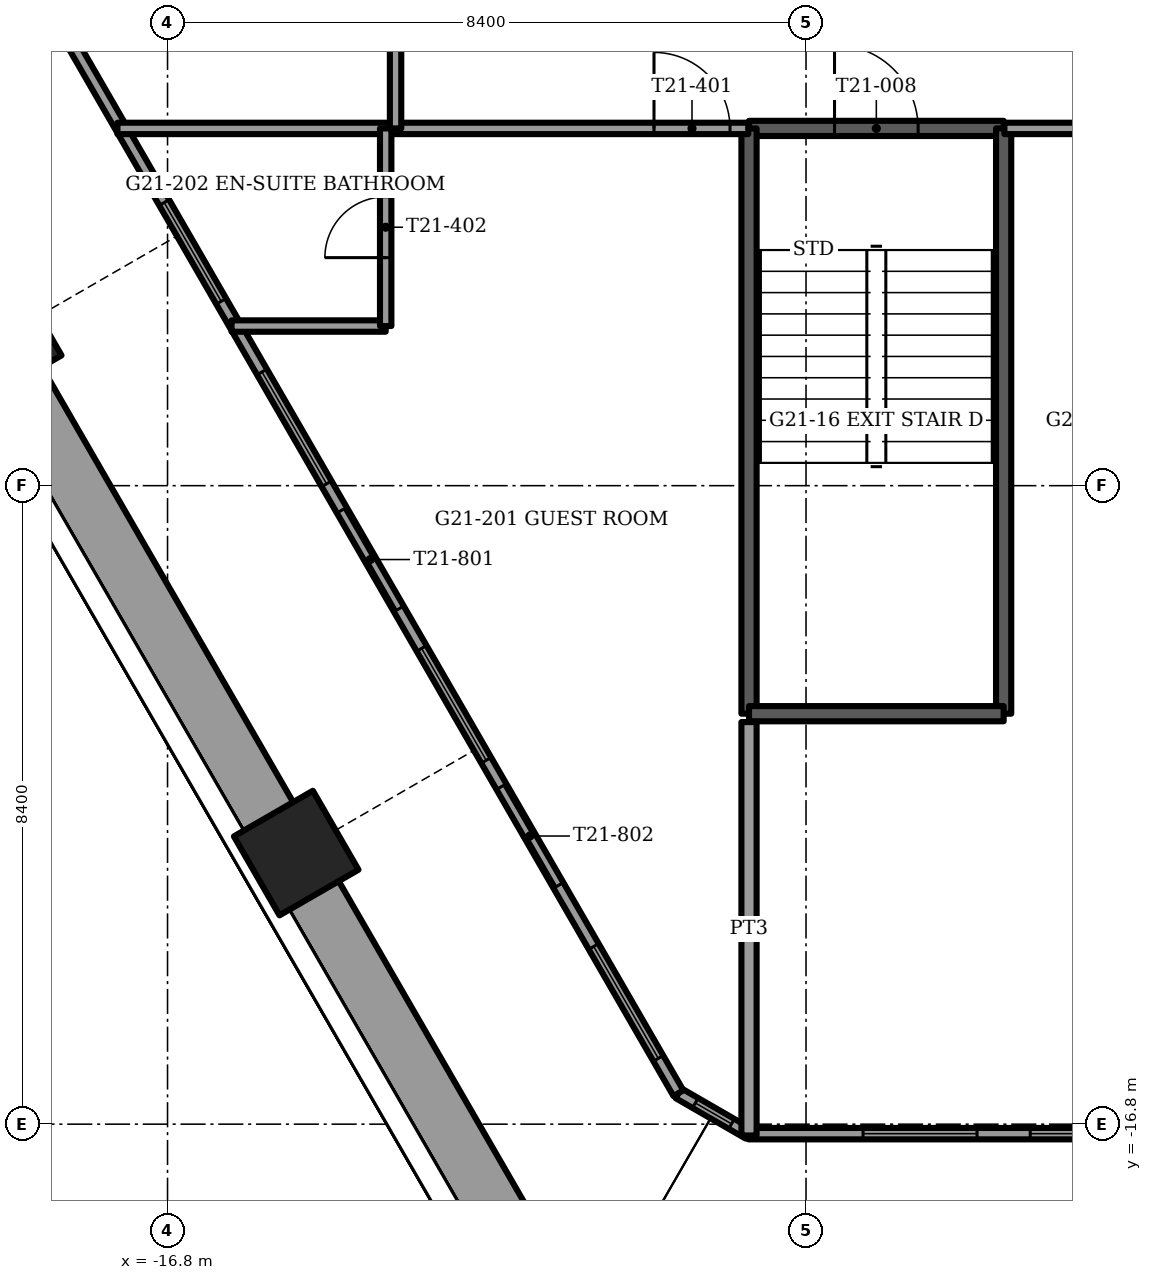
"""IFC4 building model, lengths in metres.
Left out: names, types, materials, properties, quantities, classifications, styles, units other than length and angle.
Written with IfcOpenShell. Run it as: python <this file> out.ifc"""

import sys

from ifc_helpers import new_model, si_unit, direction, frame, frame_2d, origin, origin_2d, place, context, subcontext, project, spatial, rectangle, extrude, element, fill, save


model = new_model("IFC4")
c1 = context("Model", 3, precision=1e-05, world=origin(), true_north=direction((0.0, 1.0)))
c2 = subcontext(c1, "Body", "Model", "MODEL_VIEW")
j1 = project(units=[si_unit("LENGTHUNIT", "METRE"), si_unit("PLANEANGLEUNIT", "RADIAN")], contexts=[c1])
p1 = place(None, origin())
s1 = spatial("IfcSite", under=j1, at=p1, CompositionType="ELEMENT")
p2 = place(p1, origin())
s2 = spatial("IfcBuilding", under=s1, at=p2, CompositionType="ELEMENT")
p3 = place(p2, frame((0.0, 0.0, 85.5)))
s3 = spatial("IfcBuildingStorey", under=s2, at=p3, CompositionType="ELEMENT", Elevation=85.5)
for number, where, z_axis, x_axis in (
    (1, (-19.014, -6.467, -1.2), (0.0, 0.0, 1.0), (-0.5, 0.866, 0.0)),
    (2, (-15.107, -13.233, -1.2), (0.0, 0.0, 1.0), (-0.5, 0.866, 0.0)),
):
    element("IfcColumn", number, at=place(p3, frame(where, z_axis=z_axis, x_axis=x_axis)), inside=s3, PredefinedType="COLUMN", context=c2, shape_type="SweptSolid", body=[
        extrude(rectangle(XDim=1.2, YDim=1.2, at=origin_2d()), origin(), (0.0, 0.0, 1.0), 3.75),
    ])
p4 = place(p3, frame((-18.859, -7.035, 0.0), z_axis=(0.0, 0.0, 1.0), x_axis=(0.499999023957, -0.866025967302, 0.0)))
e3 = element("IfcWall", 3, at=p4, inside=s3, PredefinedType="PARAPET", context=c2, shape_type="SweptSolid", body=[
    extrude(rectangle(XDim=6.673, YDim=0.9, at=frame_2d((3.337, 0.0))), origin(), (0.0, 0.0, 1.0), 1.1),
])
p5 = place(p3, frame((-14.952, -13.802, 0.0), z_axis=(0.0, 0.0, 1.0), x_axis=(0.499982754166, -0.866035360443, 0.0)))
e4 = element("IfcWall", 4, at=p5, inside=s3, PredefinedType="PARAPET", context=c2, shape_type="SweptSolid", body=[
    extrude(rectangle(XDim=6.333, YDim=0.9, at=frame_2d((3.167, 0.0))), origin(), (0.0, 0.0, 1.0), 1.1),
])
p6 = place(p3, frame((-19.236, -0.532, 0.0), z_axis=(0.0, 0.0, 1.0), x_axis=(0.499995945303, -0.866027744752, 0.0)))
e5 = element("IfcWall", 5, at=p6, inside=s3, PredefinedType="SOLIDWALL", context=c2, shape_type="SweptSolid", body=[
    extrude(rectangle(XDim=18.314, YDim=0.15, at=frame_2d((9.157, 0.0))), origin(), (0.0, 0.0, 1.0), 3.45),
])
p7 = place(p6, frame((4.784, 0.0, 0.15)))
e6 = element("IfcOpeningElement", 6, at=p7, cuts=e5, PredefinedType="OPENING", context=c2, shape_type="SweptSolid", body=[
    extrude(rectangle(XDim=1.5, YDim=2.85, at=frame_2d((0.75, 1.425))), frame((0.0, 0.075, 0.0), z_axis=(0.0, -1.0, 0.0), x_axis=(1.0, 0.0, 0.0)), (0.0, 0.0, 1.0), 0.15),
])
p8 = place(p6, frame((7.357, 0.0, 0.15)))
e7 = element("IfcOpeningElement", 7, at=p8, cuts=e5, PredefinedType="OPENING", context=c2, shape_type="SweptSolid", body=[
    extrude(rectangle(XDim=1.7, YDim=2.85, at=frame_2d((0.85, 1.425))), frame((0.0, 0.075, 0.0), z_axis=(0.0, -1.0, 0.0), x_axis=(1.0, 0.0, 0.0)), (0.0, 0.0, 1.0), 0.15),
])
p9 = place(p6, frame((9.457, 0.0, 0.0)))
e8 = element("IfcOpeningElement", 8, at=p9, cuts=e5, PredefinedType="OPENING", context=c2, shape_type="SweptSolid", body=[
    extrude(rectangle(XDim=1.5, YDim=2.4, at=frame_2d((0.75, 1.2))), frame((0.0, 0.075, 0.0), z_axis=(0.0, -1.0, 0.0), x_axis=(1.0, 0.0, 0.0)), (0.0, 0.0, 1.0), 0.15),
])
p10 = place(p6, frame((11.557, 0.0, 0.15)))
e9 = element("IfcOpeningElement", 9, at=p10, cuts=e5, PredefinedType="OPENING", context=c2, shape_type="SweptSolid", body=[
    extrude(rectangle(XDim=1.7, YDim=2.85, at=frame_2d((0.85, 1.425))), frame((0.0, 0.075, 0.0), z_axis=(0.0, -1.0, 0.0), x_axis=(1.0, 0.0, 0.0)), (0.0, 0.0, 1.0), 0.15),
])
p11 = place(p6, frame((13.657, 0.0, 0.0)))
e10 = element("IfcOpeningElement", 10, at=p11, cuts=e5, PredefinedType="OPENING", context=c2, shape_type="SweptSolid", body=[
    extrude(rectangle(XDim=1.5, YDim=2.4, at=frame_2d((0.75, 1.2))), frame((0.0, 0.075, 0.0), z_axis=(0.0, -1.0, 0.0), x_axis=(1.0, 0.0, 0.0)), (0.0, 0.0, 1.0), 0.15),
])
p12 = place(p6, frame((0.528, 0.0, 0.15)))
e11 = element("IfcOpeningElement", 11, at=p12, cuts=e5, PredefinedType="OPENING", context=c2, shape_type="SweptSolid", body=[
    extrude(rectangle(XDim=1.7, YDim=2.73, at=frame_2d((0.85, 1.365))), frame((0.0, 0.075, 0.0), z_axis=(0.0, -1.0, 0.0), x_axis=(1.0, 0.0, 0.0)), (0.0, 0.0, 1.0), 0.15),
])
p13 = place(p6, frame((16.085, 0.0, 0.15)))
e12 = element("IfcOpeningElement", 12, at=p13, cuts=e5, PredefinedType="OPENING", context=c2, shape_type="SweptSolid", body=[
    extrude(rectangle(XDim=1.7, YDim=2.73, at=frame_2d((0.85, 1.365))), frame((0.0, 0.075, 0.0), z_axis=(0.0, -1.0, 0.0), x_axis=(1.0, 0.0, 0.0)), (0.0, 0.0, 1.0), 0.15),
])
p14 = place(p3, frame((-9.157, -16.925, 0.0), z_axis=(0.0, 0.0, 1.0), x_axis=(1.0, 0.0, 0.0)))
e13 = element("IfcWall", 13, at=p14, inside=s3, PredefinedType="SOLIDWALL", context=c2, shape_type="SweptSolid", body=[
    extrude(rectangle(XDim=18.313, YDim=0.15, at=frame_2d((9.157, 0.0))), origin(), (0.0, 0.0, 1.0), 3.45),
])
p15 = place(p14, frame((3.707, 0.0, 0.15)))
e14 = element("IfcOpeningElement", 14, at=p15, cuts=e13, PredefinedType="OPENING", context=c2, shape_type="SweptSolid", body=[
    extrude(rectangle(XDim=0.9, YDim=2.85, at=frame_2d((0.45, 1.425))), frame((0.0, 0.075, 0.0), z_axis=(0.0, -1.0, 0.0), x_axis=(1.0, 0.0, 0.0)), (0.0, 0.0, 1.0), 0.15),
])
p16 = place(p14, frame((1.507, 0.0, 0.15)))
e15 = element("IfcOpeningElement", 15, at=p16, cuts=e13, PredefinedType="OPENING", context=c2, shape_type="SweptSolid", body=[
    extrude(rectangle(XDim=1.5, YDim=2.85, at=frame_2d((0.75, 1.425))), frame((0.0, 0.075, 0.0), z_axis=(0.0, -1.0, 0.0), x_axis=(1.0, 0.0, 0.0)), (0.0, 0.0, 1.0), 0.15),
])
p17 = place(p14, frame((5.257, 0.0, 0.15)))
e16 = element("IfcOpeningElement", 16, at=p17, cuts=e13, PredefinedType="OPENING", context=c2, shape_type="SweptSolid", body=[
    extrude(rectangle(XDim=1.7, YDim=2.85, at=frame_2d((0.85, 1.425))), frame((0.0, 0.075, 0.0), z_axis=(0.0, -1.0, 0.0), x_axis=(1.0, 0.0, 0.0)), (0.0, 0.0, 1.0), 0.15),
])
p18 = place(p14, frame((7.307, 0.0, 0.15)))
e17 = element("IfcOpeningElement", 17, at=p18, cuts=e13, PredefinedType="OPENING", context=c2, shape_type="SweptSolid", body=[
    extrude(rectangle(XDim=1.5, YDim=2.85, at=frame_2d((0.75, 1.425))), frame((0.0, 0.075, 0.0), z_axis=(0.0, -1.0, 0.0), x_axis=(1.0, 0.0, 0.0)), (0.0, 0.0, 1.0), 0.15),
])
p19 = place(p14, frame((9.507, 0.0, 0.15)))
e18 = element("IfcOpeningElement", 18, at=p19, cuts=e13, PredefinedType="OPENING", context=c2, shape_type="SweptSolid", body=[
    extrude(rectangle(XDim=1.7, YDim=2.85, at=frame_2d((0.85, 1.425))), frame((0.0, 0.075, 0.0), z_axis=(0.0, -1.0, 0.0), x_axis=(1.0, 0.0, 0.0)), (0.0, 0.0, 1.0), 0.15),
])
p20 = place(p14, frame((11.557, 0.0, 0.0)))
e19 = element("IfcOpeningElement", 19, at=p20, cuts=e13, PredefinedType="OPENING", context=c2, shape_type="SweptSolid", body=[
    extrude(rectangle(XDim=1.5, YDim=2.4, at=frame_2d((0.75, 1.2))), frame((0.0, 0.075, 0.0), z_axis=(0.0, -1.0, 0.0), x_axis=(1.0, 0.0, 0.0)), (0.0, 0.0, 1.0), 0.15),
])
p21 = place(p14, frame((15.307, 0.0, 0.15)))
e20 = element("IfcOpeningElement", 20, at=p21, cuts=e13, PredefinedType="OPENING", context=c2, shape_type="SweptSolid", body=[
    extrude(rectangle(XDim=1.7, YDim=2.85, at=frame_2d((0.85, 1.425))), frame((0.0, 0.075, 0.0), z_axis=(0.0, -1.0, 0.0), x_axis=(1.0, 0.0, 0.0)), (0.0, 0.0, 1.0), 0.15),
])
p22 = place(p3, frame((-10.079, -16.393, 0.0), z_axis=(0.0, 0.0, 1.0), x_axis=(0.866048165231, -0.499960573946, 0.0)))
e21 = element("IfcWall", 21, at=p22, inside=s3, PredefinedType="SOLIDWALL", context=c2, shape_type="SweptSolid", body=[
    extrude(rectangle(XDim=1.065, YDim=0.15, at=frame_2d((0.532, 0.0))), origin(), (0.0, 0.0, 1.0), 3.45),
])
p23 = place(p22, frame((0.258, 0.0, 0.15)))
e22 = element("IfcOpeningElement", 22, at=p23, cuts=e21, PredefinedType="OPENING", context=c2, shape_type="SweptSolid", body=[
    extrude(rectangle(XDim=0.55, YDim=2.85, at=frame_2d((0.275, 1.425))), frame((0.0, 0.075, 0.0), z_axis=(0.0, -1.0, 0.0), x_axis=(1.0, 0.0, 0.0)), (0.0, 0.0, 1.0), 0.15),
])
p24 = place(p3, frame((-9.15, -3.7, -0.3), z_axis=(0.0, 0.0, 1.0), x_axis=(1.0, 0.0, 0.0)))
e23 = element("IfcWall", 23, at=p24, inside=s3, PredefinedType="SOLIDWALL", context=c2, shape_type="SweptSolid", body=[
    extrude(rectangle(XDim=3.35, YDim=0.2, at=frame_2d((1.675, 0.0))), origin(), (0.0, 0.0, 1.0), 3.75),
])
p25 = place(p24, frame((1.125, 0.0, 0.0)))
e24 = element("IfcOpeningElement", 24, at=p25, cuts=e23, PredefinedType="OPENING", context=c2, shape_type="SweptSolid", body=[
    extrude(rectangle(XDim=1.1, YDim=2.1, at=frame_2d((0.55, 1.05))), frame((0.0, 0.1, 0.0), z_axis=(0.0, -1.0, 0.0), x_axis=(1.0, 0.0, 0.0)), (0.0, 0.0, 1.0), 0.2),
])
for number, where, z_axis, x_axis in (
    (25, (-9.15, -3.7, -0.3), (0.0, 0.0, 1.0), (0.0, -1.0, 0.0)),
    (26, (-5.8, -3.7, -0.3), (0.0, 0.0, 1.0), (0.0, -1.0, 0.0)),
):
    element("IfcWall", number, at=place(p3, frame(where, z_axis=z_axis, x_axis=x_axis)), inside=s3, PredefinedType="SOLIDWALL", context=c2, shape_type="SweptSolid", body=[
        extrude(rectangle(XDim=7.7, YDim=0.2, at=frame_2d((3.85, 0.0))), origin(), (0.0, 0.0, 1.0), 3.75),
    ])
p26 = place(p3, frame((-9.15, -11.4, -0.3), z_axis=(0.0, 0.0, 1.0), x_axis=(1.0, 0.0, 0.0)))
e27 = element("IfcWall", 27, at=p26, inside=s3, PredefinedType="SOLIDWALL", context=c2, shape_type="SweptSolid", body=[
    extrude(rectangle(XDim=3.35, YDim=0.2, at=frame_2d((1.675, 0.0))), origin(), (0.0, 0.0, 1.0), 3.75),
])
p27 = place(p3, frame((-15.958, -6.3, 0.0), z_axis=(0.0, 0.0, 1.0), x_axis=(1.0, 0.0, 0.0)))
e28 = element("IfcWall", 28, at=p27, inside=s3, PredefinedType="PARTITIONING", context=c2, shape_type="SweptSolid", body=[
    extrude(rectangle(XDim=2.028, YDim=0.15, at=frame_2d((1.014, 0.0))), origin(), (0.0, 0.0, 1.0), 3.45),
])
p28 = place(p3, frame((-17.459, -3.7, 0.0), z_axis=(0.0, 0.0, 1.0), x_axis=(1.0, 0.0, 0.0)))
e29 = element("IfcWall", 29, at=p28, inside=s3, PredefinedType="PARTITIONING", context=c2, shape_type="SweptSolid", body=[
    extrude(rectangle(XDim=8.299, YDim=0.15, at=frame_2d((4.149, 0.0))), origin(), (0.0, 0.0, 1.0), 3.45),
])
p29 = place(p28, frame((7.059, 0.0, 0.0)))
e30 = element("IfcOpeningElement", 30, at=p29, cuts=e29, PredefinedType="OPENING", context=c2, shape_type="SweptSolid", body=[
    extrude(rectangle(XDim=1.0, YDim=2.1, at=frame_2d((0.5, 1.05))), frame((0.0, 0.075, 0.0), z_axis=(0.0, -1.0, 0.0), x_axis=(1.0, 0.0, 0.0)), (0.0, 0.0, 1.0), 0.15),
])
p30 = place(p3, frame((-5.79, -3.7, 0.0), z_axis=(0.0, 0.0, 1.0), x_axis=(1.0, 0.0, 0.0)))
e31 = element("IfcWall", 31, at=p30, inside=s3, PredefinedType="PARTITIONING", context=c2, shape_type="SweptSolid", body=[
    extrude(rectangle(XDim=11.58, YDim=0.15, at=frame_2d((5.79, 0.0))), origin(), (0.0, 0.0, 1.0), 3.45),
])
p31 = place(p30, frame((2.39, 0.0, 0.0)))
e32 = element("IfcOpeningElement", 32, at=p31, cuts=e31, PredefinedType="OPENING", context=c2, shape_type="SweptSolid", body=[
    extrude(rectangle(XDim=1.0, YDim=2.1, at=frame_2d((0.5, 1.05))), frame((0.0, 0.075, 0.0), z_axis=(0.0, -1.0, 0.0), x_axis=(1.0, 0.0, 0.0)), (0.0, 0.0, 1.0), 0.15),
])
p32 = place(p30, frame((10.34, 0.0, 0.0)))
e33 = element("IfcOpeningElement", 33, at=p32, cuts=e31, PredefinedType="OPENING", context=c2, shape_type="SweptSolid", body=[
    extrude(rectangle(XDim=1.0, YDim=2.1, at=frame_2d((0.5, 1.05))), frame((0.0, 0.075, 0.0), z_axis=(0.0, -1.0, 0.0), x_axis=(1.0, 0.0, 0.0)), (0.0, 0.0, 1.0), 0.15),
])
p33 = place(p3, frame((-9.15, -16.949, 0.0), z_axis=(0.0, 0.0, 1.0), x_axis=(0.0, 1.0, 0.0)))
e34 = element("IfcWall", 34, at=p33, inside=s3, PredefinedType="PARTITIONING", context=c2, shape_type="SweptSolid", body=[
    extrude(rectangle(XDim=5.439, YDim=0.2, at=frame_2d((2.719, 0.0))), origin(), (0.0, 0.0, 1.0), 3.45),
])
p34 = place(p3, frame((-13.8, -3.7, 0.0), z_axis=(0.0, 0.0, 1.0), x_axis=(0.0, 1.0, 0.0)))
e35 = element("IfcWall", 35, at=p34, inside=s3, PredefinedType="PARTITIONING", context=c2, shape_type="SweptSolid", body=[
    extrude(rectangle(XDim=13.738, YDim=0.15, at=frame_2d((6.869, 0.0))), origin(), (0.0, 0.0, 1.0), 3.45),
])
p35 = place(p34, frame((4.412, 0.0, 0.0)))
e36 = element("IfcOpeningElement", 36, at=p35, cuts=e35, PredefinedType="OPENING", context=c2, shape_type="SweptSolid", body=[
    extrude(rectangle(XDim=1.0, YDim=2.1, at=frame_2d((0.5, 1.05))), frame((0.0, 0.075, 0.0), z_axis=(0.0, -1.0, 0.0), x_axis=(1.0, 0.0, 0.0)), (0.0, 0.0, 1.0), 0.15),
])
p36 = place(p34, frame((10.45, 0.0, 0.0)))
e37 = element("IfcOpeningElement", 37, at=p36, cuts=e35, PredefinedType="OPENING", context=c2, shape_type="SweptSolid", body=[
    extrude(rectangle(XDim=1.0, YDim=2.1, at=frame_2d((0.5, 1.05))), frame((0.0, 0.075, 0.0), z_axis=(0.0, -1.0, 0.0), x_axis=(1.0, 0.0, 0.0)), (0.0, 0.0, 1.0), 0.15),
])
p37 = place(p3, frame((-13.93, -6.3, 0.0), z_axis=(0.0, 0.0, 1.0), x_axis=(0.0, 1.0, 0.0)))
e38 = element("IfcWall", 38, at=p37, inside=s3, PredefinedType="PARTITIONING", context=c2, shape_type="SweptSolid", body=[
    extrude(rectangle(XDim=2.6, YDim=0.15, at=frame_2d((1.3, 0.0))), origin(), (0.0, 0.0, 1.0), 3.45),
])
p38 = place(p37, frame((0.9, 0.0, 0.0)))
e39 = element("IfcOpeningElement", 39, at=p38, cuts=e38, PredefinedType="OPENING", context=c2, shape_type="SweptSolid", body=[
    extrude(rectangle(XDim=0.8, YDim=2.1, at=frame_2d((0.4, 1.05))), frame((0.0, 0.075, 0.0), z_axis=(0.0, -1.0, 0.0), x_axis=(1.0, 0.0, 0.0)), (0.0, 0.0, 1.0), 0.15),
])
p39 = place(p7, origin())
e40 = element("IfcWindow", 40, at=p39, inside=s3, PartitioningType="SINGLE_PANEL", PredefinedType="WINDOW", context=c2, shape_type="SweptSolid", body=[
    extrude(rectangle(XDim=1.5, YDim=2.85, at=frame_2d((0.75, 1.425))), frame((0.0, 0.03, 0.0), z_axis=(0.0, -1.0, 0.0), x_axis=(1.0, 0.0, 0.0)), (0.0, 0.0, 1.0), 0.06),
])
fill(e6, e40)
p40 = place(p8, origin())
e41 = element("IfcWindow", 41, at=p40, inside=s3, PartitioningType="SINGLE_PANEL", PredefinedType="WINDOW", context=c2, shape_type="SweptSolid", body=[
    extrude(rectangle(XDim=1.7, YDim=2.85, at=frame_2d((0.85, 1.425))), frame((0.0, 0.03, 0.0), z_axis=(0.0, -1.0, 0.0), x_axis=(1.0, 0.0, 0.0)), (0.0, 0.0, 1.0), 0.06),
])
fill(e7, e41)
p41 = place(p9, origin())
e42 = element("IfcDoor", 42, at=p41, inside=s3, OperationType="SLIDING_TO_RIGHT", PredefinedType="DOOR", context=c2, shape_type="SweptSolid", body=[
    extrude(rectangle(XDim=1.5, YDim=2.4, at=frame_2d((0.75, 1.2))), frame((0.0, 0.025, 0.0), z_axis=(0.0, -1.0, 0.0), x_axis=(1.0, 0.0, 0.0)), (0.0, 0.0, 1.0), 0.05),
])
fill(e8, e42)
p42 = place(p10, origin())
e43 = element("IfcWindow", 43, at=p42, inside=s3, PartitioningType="SINGLE_PANEL", PredefinedType="WINDOW", context=c2, shape_type="SweptSolid", body=[
    extrude(rectangle(XDim=1.7, YDim=2.85, at=frame_2d((0.85, 1.425))), frame((0.0, 0.03, 0.0), z_axis=(0.0, -1.0, 0.0), x_axis=(1.0, 0.0, 0.0)), (0.0, 0.0, 1.0), 0.06),
])
fill(e9, e43)
p43 = place(p11, origin())
e44 = element("IfcDoor", 44, at=p43, inside=s3, OperationType="SLIDING_TO_LEFT", PredefinedType="DOOR", context=c2, shape_type="SweptSolid", body=[
    extrude(rectangle(XDim=1.5, YDim=2.4, at=frame_2d((0.75, 1.2))), frame((0.0, 0.025, 0.0), z_axis=(0.0, -1.0, 0.0), x_axis=(1.0, 0.0, 0.0)), (0.0, 0.0, 1.0), 0.05),
])
fill(e10, e44)
p44 = place(p13, origin())
e45 = element("IfcWindow", 45, at=p44, inside=s3, PartitioningType="SINGLE_PANEL", PredefinedType="WINDOW", context=c2, shape_type="SweptSolid", body=[
    extrude(rectangle(XDim=1.7, YDim=2.73, at=frame_2d((0.85, 1.365))), frame((0.0, 0.03, 0.0), z_axis=(0.0, -1.0, 0.0), x_axis=(1.0, 0.0, 0.0)), (0.0, 0.0, 1.0), 0.06),
])
fill(e12, e45)
p45 = place(p15, origin())
e46 = element("IfcWindow", 46, at=p45, inside=s3, PartitioningType="SINGLE_PANEL", PredefinedType="WINDOW", context=c2, shape_type="SweptSolid", body=[
    extrude(rectangle(XDim=0.9, YDim=2.85, at=frame_2d((0.45, 1.425))), frame((0.0, 0.03, 0.0), z_axis=(0.0, -1.0, 0.0), x_axis=(1.0, 0.0, 0.0)), (0.0, 0.0, 1.0), 0.06),
])
fill(e14, e46)
p46 = place(p16, origin())
e47 = element("IfcWindow", 47, at=p46, inside=s3, PartitioningType="SINGLE_PANEL", PredefinedType="WINDOW", context=c2, shape_type="SweptSolid", body=[
    extrude(rectangle(XDim=1.5, YDim=2.85, at=frame_2d((0.75, 1.425))), frame((0.0, 0.03, 0.0), z_axis=(0.0, -1.0, 0.0), x_axis=(1.0, 0.0, 0.0)), (0.0, 0.0, 1.0), 0.06),
])
fill(e15, e47)
p47 = place(p23, origin())
e48 = element("IfcWindow", 48, at=p47, inside=s3, PartitioningType="SINGLE_PANEL", PredefinedType="WINDOW", context=c2, shape_type="SweptSolid", body=[
    extrude(rectangle(XDim=0.55, YDim=2.85, at=frame_2d((0.275, 1.425))), frame((0.0, 0.03, 0.0), z_axis=(0.0, -1.0, 0.0), x_axis=(1.0, 0.0, 0.0)), (0.0, 0.0, 1.0), 0.06),
])
fill(e22, e48)
p48 = place(p25, origin())
e49 = element("IfcDoor", 49, at=p48, inside=s3, OperationType="SINGLE_SWING_LEFT", PredefinedType="DOOR", context=c2, shape_type="SweptSolid", body=[
    extrude(rectangle(XDim=1.1, YDim=2.1, at=frame_2d((0.55, 1.05))), frame((0.0, 0.025, 0.0), z_axis=(0.0, -1.0, 0.0), x_axis=(1.0, 0.0, 0.0)), (0.0, 0.0, 1.0), 0.05),
])
fill(e24, e49)
p49 = place(p29, origin())
e50 = element("IfcDoor", 50, at=p49, inside=s3, OperationType="SINGLE_SWING_RIGHT", PredefinedType="DOOR", context=c2, shape_type="SweptSolid", body=[
    extrude(rectangle(XDim=1.0, YDim=2.1, at=frame_2d((0.5, 1.05))), frame((0.0, 0.025, 0.0), z_axis=(0.0, -1.0, 0.0), x_axis=(1.0, 0.0, 0.0)), (0.0, 0.0, 1.0), 0.05),
])
fill(e30, e50)
p50 = place(p38, origin())
e51 = element("IfcDoor", 51, at=p50, inside=s3, OperationType="SINGLE_SWING_RIGHT", PredefinedType="DOOR", context=c2, shape_type="SweptSolid", body=[
    extrude(rectangle(XDim=0.8, YDim=2.1, at=frame_2d((0.4, 1.05))), frame((0.0, 0.025, 0.0), z_axis=(0.0, -1.0, 0.0), x_axis=(1.0, 0.0, 0.0)), (0.0, 0.0, 1.0), 0.05),
])
fill(e39, e51)
save(model, sys.argv[1])
